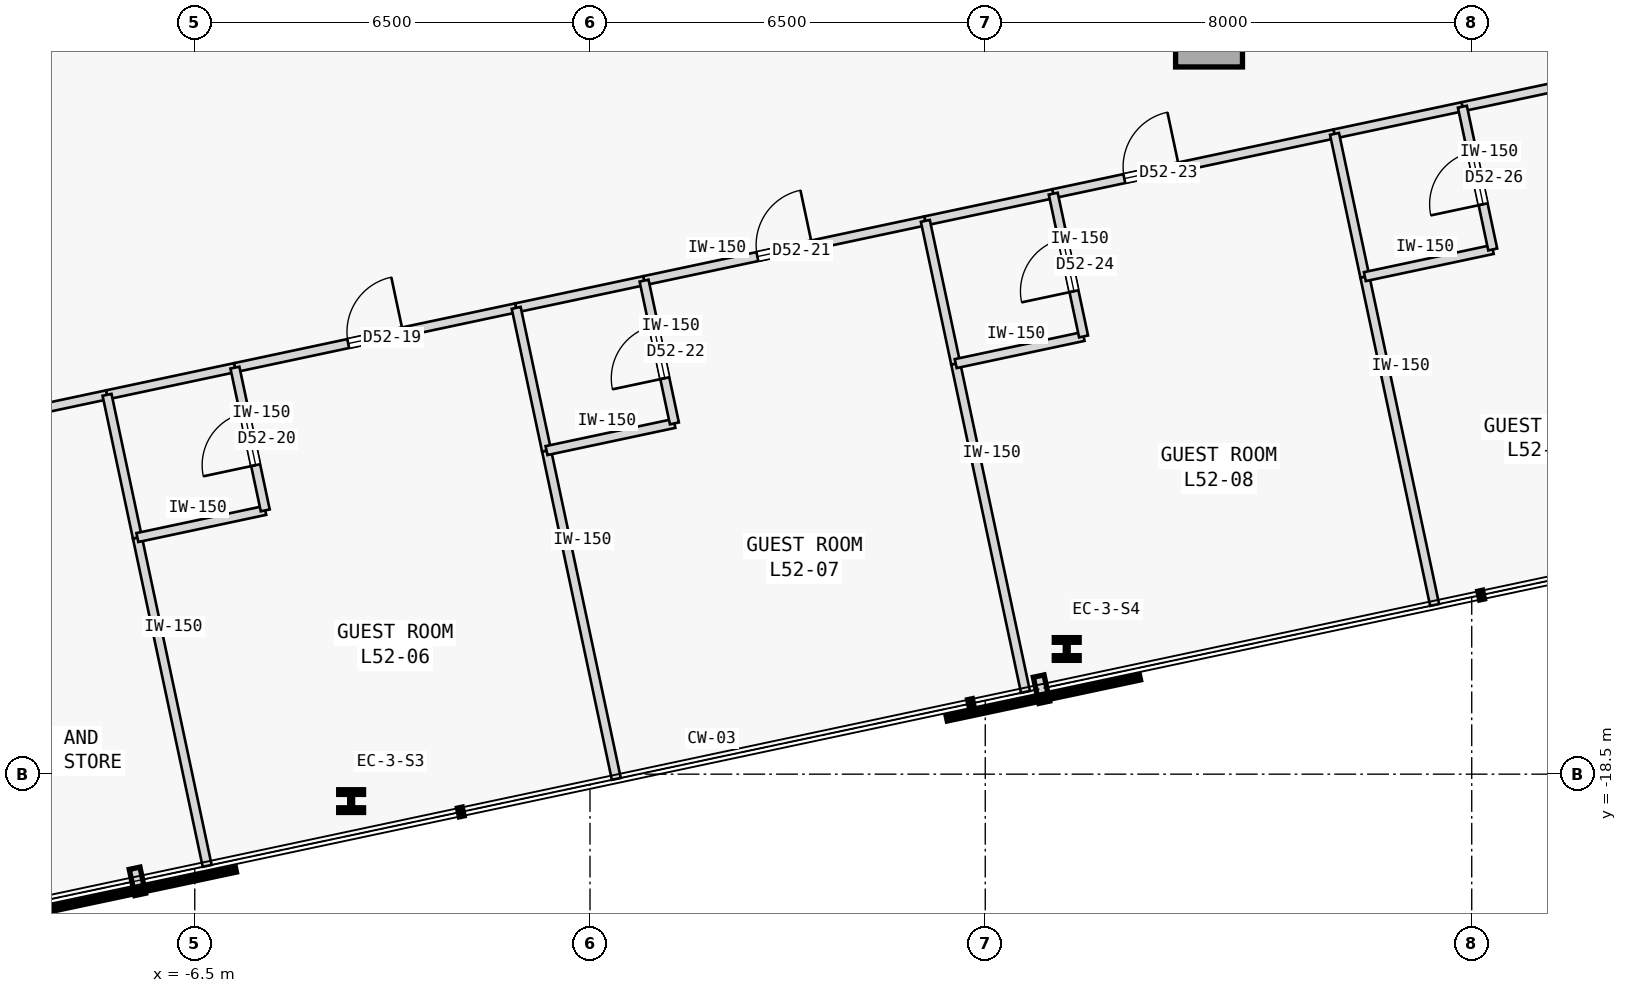
"""IFC4 building model, lengths in metres.
Left out: names, types, materials, properties, quantities, classifications, styles, units other than length and angle.
Written with IfcOpenShell. Run it as: python <this file> out.ifc"""

import sys

from ifc_helpers import new_model, si_unit, direction, frame, frame_2d, origin, origin_2d, place, context, subcontext, project, spatial, rectangle, i_section, extrude, element, fill, save


model = new_model("IFC4")
c1 = context("Model", 3, precision=1e-05, world=origin(), true_north=direction((0.0, 1.0)))
c2 = subcontext(c1, "Body", "Model", "MODEL_VIEW")
j1 = project(units=[si_unit("LENGTHUNIT", "METRE"), si_unit("PLANEANGLEUNIT", "RADIAN")], contexts=[c1])
p1 = place(None, origin())
s1 = spatial("IfcSite", under=j1, at=p1, CompositionType="ELEMENT")
p2 = place(p1, origin())
s2 = spatial("IfcBuilding", under=s1, at=p2, CompositionType="ELEMENT")
p3 = place(p2, frame((0.0, 0.0, 199.0)))
s3 = spatial("IfcBuildingStorey", under=s2, at=p3, CompositionType="ELEMENT", Elevation=199.0)
p4 = place(p3, frame((10.18, -6.32, 0.0), z_axis=(0.0, 0.0, 1.0), x_axis=(1.0, 0.0, 0.0)))
e1 = element("IfcColumn", 1, at=p4, inside=s3, PredefinedType="COLUMN", context=c2, shape_type="SweptSolid", body=[
    extrude(rectangle(XDim=1.1, YDim=1.1, at=origin_2d()), origin(), (0.0, 0.0, 1.0), 3.4),
])
for number, where, z_axis, x_axis in (
    (2, (-3.928, -18.943, 0.0), (0.0, 0.0, 1.0), (1.0, 0.0, 0.0)),
    (3, (7.84, -16.441, 0.0), (0.0, 0.0, 1.0), (1.0, 0.0, 0.0)),
):
    element("IfcColumn", number, at=place(p3, frame(where, z_axis=z_axis, x_axis=x_axis)), inside=s3, PredefinedType="COLUMN", context=c2, shape_type="SweptSolid", body=[
        extrude(i_section(OverallWidth=0.409, OverallDepth=0.374, WebThickness=0.048, FlangeThickness=0.077, FilletRadius=0.015, at=origin_2d()), origin(), (0.0, 0.0, 1.0), 3.4),
    ])
p5 = place(p3, frame((-12.862, -13.307, 0.0), z_axis=(0.0, 0.0, 1.0), x_axis=(0.978145647498, 0.207920879857, 0.0)))
e4 = element("IfcWall", 4, at=p5, inside=s3, PredefinedType="PARTITIONING", context=c2, shape_type="SweptSolid", body=[
    extrude(rectangle(XDim=5.029, YDim=0.15, at=frame_2d((2.515, 0.0))), origin(), (0.0, 0.0, 1.0), 3.0),
])
p6 = place(p3, frame((-5.84, -11.814, 0.0), z_axis=(0.0, 0.0, 1.0), x_axis=(0.978148615161, 0.207906918255, 0.0)))
e5 = element("IfcWall", 5, at=p6, inside=s3, PredefinedType="PARTITIONING", context=c2, shape_type="SweptSolid", body=[
    extrude(rectangle(XDim=4.729, YDim=0.15, at=frame_2d((2.364, 0.0))), origin(), (0.0, 0.0, 1.0), 3.0),
])
p7 = place(p6, frame((1.905, 0.0, 0.0)))
e6 = element("IfcOpeningElement", 6, at=p7, cuts=e5, PredefinedType="OPENING", context=c2, shape_type="SweptSolid", body=[
    extrude(rectangle(XDim=0.92, YDim=2.15, at=frame_2d((0.46, 1.075))), frame((0.0, 0.085, 0.0), z_axis=(0.0, -1.0, 0.0), x_axis=(1.0, 0.0, 0.0)), (0.0, 0.0, 1.0), 0.17),
])
p8 = place(p3, frame((-7.943, -12.261, 0.0), z_axis=(0.0, 0.0, 1.0), x_axis=(0.978146728319, 0.207915795165, 0.0)))
e7 = element("IfcWall", 7, at=p8, inside=s3, PredefinedType="PARTITIONING", context=c2, shape_type="SweptSolid", body=[
    extrude(rectangle(XDim=2.15, YDim=0.15, at=frame_2d((1.075, 0.0))), origin(), (0.0, 0.0, 1.0), 3.0),
])
p9 = place(p3, frame((0.889, -10.384, 0.0), z_axis=(0.0, 0.0, 1.0), x_axis=(0.978150846638, 0.207896419455, 0.0)))
e8 = element("IfcWall", 8, at=p9, inside=s3, PredefinedType="PARTITIONING", context=c2, shape_type="SweptSolid", body=[
    extrude(rectangle(XDim=4.729, YDim=0.15, at=frame_2d((2.365, 0.0))), origin(), (0.0, 0.0, 1.0), 3.0),
])
p10 = place(p9, frame((1.905, 0.0, 0.0)))
e9 = element("IfcOpeningElement", 9, at=p10, cuts=e8, PredefinedType="OPENING", context=c2, shape_type="SweptSolid", body=[
    extrude(rectangle(XDim=0.92, YDim=2.15, at=frame_2d((0.46, 1.075))), frame((0.0, 0.085, 0.0), z_axis=(0.0, -1.0, 0.0), x_axis=(1.0, 0.0, 0.0)), (0.0, 0.0, 1.0), 0.17),
])
p11 = place(p3, frame((-1.214, -10.831, 0.0), z_axis=(0.0, 0.0, 1.0), x_axis=(0.978146728319, 0.207915795165, 0.0)))
e10 = element("IfcWall", 10, at=p11, inside=s3, PredefinedType="PARTITIONING", context=c2, shape_type="SweptSolid", body=[
    extrude(rectangle(XDim=2.15, YDim=0.15, at=frame_2d((1.075, 0.0))), origin(), (0.0, 0.0, 1.0), 3.0),
])
p12 = place(p3, frame((7.618, -8.954, 0.0), z_axis=(0.0, 0.0, 1.0), x_axis=(0.978140347221, 0.207945812984, 0.0)))
e11 = element("IfcWall", 11, at=p12, inside=s3, PredefinedType="PARTITIONING", context=c2, shape_type="SweptSolid", body=[
    extrude(rectangle(XDim=4.729, YDim=0.15, at=frame_2d((2.365, 0.0))), origin(), (0.0, 0.0, 1.0), 3.0),
])
p13 = place(p12, frame((1.195, 0.0, 0.0)))
e12 = element("IfcOpeningElement", 12, at=p13, cuts=e11, PredefinedType="OPENING", context=c2, shape_type="SweptSolid", body=[
    extrude(rectangle(XDim=0.92, YDim=2.15, at=frame_2d((0.46, 1.075))), frame((0.0, 0.085, 0.0), z_axis=(0.0, -1.0, 0.0), x_axis=(1.0, 0.0, 0.0)), (0.0, 0.0, 1.0), 0.17),
])
p14 = place(p3, frame((5.515, -9.401, 0.0), z_axis=(0.0, 0.0, 1.0), x_axis=(0.978146728319, 0.207915795165, 0.0)))
e13 = element("IfcWall", 13, at=p14, inside=s3, PredefinedType="PARTITIONING", context=c2, shape_type="SweptSolid", body=[
    extrude(rectangle(XDim=2.15, YDim=0.15, at=frame_2d((1.075, 0.0))), origin(), (0.0, 0.0, 1.0), 3.0),
])
p15 = place(p3, frame((14.346, -7.524, 0.0), z_axis=(0.0, 0.0, 1.0), x_axis=(0.97816208355, 0.207843542851, 0.0)))
e14 = element("IfcWall", 14, at=p15, inside=s3, PredefinedType="PARTITIONING", context=c2, shape_type="SweptSolid", body=[
    extrude(rectangle(XDim=2.879, YDim=0.15, at=frame_2d((1.439, 0.0))), origin(), (0.0, 0.0, 1.0), 3.0),
])
p16 = place(p3, frame((12.243, -7.971, 0.0), z_axis=(0.0, 0.0, 1.0), x_axis=(0.978146728319, 0.207915795165, 0.0)))
e15 = element("IfcWall", 15, at=p16, inside=s3, PredefinedType="PARTITIONING", context=c2, shape_type="SweptSolid", body=[
    extrude(rectangle(XDim=2.15, YDim=0.15, at=frame_2d((1.075, 0.0))), origin(), (0.0, 0.0, 1.0), 3.0),
])
p17 = place(p3, frame((-6.296, -20.008, 0.0), z_axis=(0.0, 0.0, 1.0), x_axis=(-0.20792487872, 0.978144797466, 0.0)))
e16 = element("IfcWall", 16, at=p17, inside=s3, PredefinedType="PARTITIONING", context=c2, shape_type="SweptSolid", body=[
    extrude(rectangle(XDim=5.52, YDim=0.15, at=frame_2d((2.76, 0.0))), origin(), (0.0, 0.0, 1.0), 3.0),
])
p18 = place(p3, frame((-7.444, -14.609, 0.0), z_axis=(0.0, 0.0, 1.0), x_axis=(-0.207917150959, 0.978146440129, 0.0)))
e17 = element("IfcWall", 17, at=p18, inside=s3, PredefinedType="PARTITIONING", context=c2, shape_type="SweptSolid", body=[
    extrude(rectangle(XDim=2.4, YDim=0.15, at=frame_2d((1.2, 0.0))), origin(), (0.0, 0.0, 1.0), 3.0),
])
p19 = place(p3, frame((-7.444, -14.609, 0.0), z_axis=(0.0, 0.0, 1.0), x_axis=(0.978141818715, 0.207938891219, 0.0)))
e18 = element("IfcWall", 18, at=p19, inside=s3, PredefinedType="PARTITIONING", context=c2, shape_type="SweptSolid", body=[
    extrude(rectangle(XDim=2.15, YDim=0.15, at=frame_2d((1.075, 0.0))), origin(), (0.0, 0.0, 1.0), 3.0),
])
p20 = place(p3, frame((-5.341, -14.162, 0.0), z_axis=(0.0, 0.0, 1.0), x_axis=(-0.207819824493, 0.978167123015, 0.0)))
e19 = element("IfcWall", 19, at=p20, inside=s3, PredefinedType="PARTITIONING", context=c2, shape_type="SweptSolid", body=[
    extrude(rectangle(XDim=2.4, YDim=0.15, at=frame_2d((1.2, 0.0))), origin(), (0.0, 0.0, 1.0), 3.0),
])
p21 = place(p20, frame((0.76, 0.0, 0.0)))
e20 = element("IfcOpeningElement", 20, at=p21, cuts=e19, PredefinedType="OPENING", context=c2, shape_type="SweptSolid", body=[
    extrude(rectangle(XDim=0.88, YDim=2.15, at=frame_2d((0.44, 1.075))), frame((0.0, 0.085, 0.0), z_axis=(0.0, -1.0, 0.0), x_axis=(1.0, 0.0, 0.0)), (0.0, 0.0, 1.0), 0.17),
])
p22 = place(p3, frame((0.433, -18.578, 0.0), z_axis=(0.0, 0.0, 1.0), x_axis=(-0.20791588359, 0.978146709523, 0.0)))
e21 = element("IfcWall", 21, at=p22, inside=s3, PredefinedType="PARTITIONING", context=c2, shape_type="SweptSolid", body=[
    extrude(rectangle(XDim=5.52, YDim=0.15, at=frame_2d((2.76, 0.0))), origin(), (0.0, 0.0, 1.0), 3.0),
])
p23 = place(p3, frame((-0.715, -13.179, 0.0), z_axis=(0.0, 0.0, 1.0), x_axis=(-0.207937840262, 0.978142042133, 0.0)))
e22 = element("IfcWall", 22, at=p23, inside=s3, PredefinedType="PARTITIONING", context=c2, shape_type="SweptSolid", body=[
    extrude(rectangle(XDim=2.4, YDim=0.15, at=frame_2d((1.2, 0.0))), origin(), (0.0, 0.0, 1.0), 3.0),
])
p24 = place(p3, frame((-0.715, -13.179, 0.0), z_axis=(0.0, 0.0, 1.0), x_axis=(0.978146728319, 0.207915795165, 0.0)))
e23 = element("IfcWall", 23, at=p24, inside=s3, PredefinedType="PARTITIONING", context=c2, shape_type="SweptSolid", body=[
    extrude(rectangle(XDim=2.15, YDim=0.15, at=frame_2d((1.075, 0.0))), origin(), (0.0, 0.0, 1.0), 3.0),
])
p25 = place(p3, frame((1.388, -12.732, 0.0), z_axis=(0.0, 0.0, 1.0), x_axis=(-0.207937840262, 0.978142042133, 0.0)))
e24 = element("IfcWall", 24, at=p25, inside=s3, PredefinedType="PARTITIONING", context=c2, shape_type="SweptSolid", body=[
    extrude(rectangle(XDim=2.4, YDim=0.15, at=frame_2d((1.2, 0.0))), origin(), (0.0, 0.0, 1.0), 3.0),
])
p26 = place(p25, frame((0.76, 0.0, 0.0)))
e25 = element("IfcOpeningElement", 25, at=p26, cuts=e24, PredefinedType="OPENING", context=c2, shape_type="SweptSolid", body=[
    extrude(rectangle(XDim=0.88, YDim=2.15, at=frame_2d((0.44, 1.075))), frame((0.0, 0.085, 0.0), z_axis=(0.0, -1.0, 0.0), x_axis=(1.0, 0.0, 0.0)), (0.0, 0.0, 1.0), 0.17),
])
p27 = place(p3, frame((7.161, -17.148, 0.0), z_axis=(0.0, 0.0, 1.0), x_axis=(-0.20791588359, 0.978146709523, 0.0)))
e26 = element("IfcWall", 26, at=p27, inside=s3, PredefinedType="PARTITIONING", context=c2, shape_type="SweptSolid", body=[
    extrude(rectangle(XDim=5.52, YDim=0.15, at=frame_2d((2.76, 0.0))), origin(), (0.0, 0.0, 1.0), 3.0),
])
p28 = place(p3, frame((6.014, -11.749, 0.0), z_axis=(0.0, 0.0, 1.0), x_axis=(-0.207937840262, 0.978142042133, 0.0)))
e27 = element("IfcWall", 27, at=p28, inside=s3, PredefinedType="PARTITIONING", context=c2, shape_type="SweptSolid", body=[
    extrude(rectangle(XDim=2.4, YDim=0.15, at=frame_2d((1.2, 0.0))), origin(), (0.0, 0.0, 1.0), 3.0),
])
p29 = place(p3, frame((6.014, -11.749, 0.0), z_axis=(0.0, 0.0, 1.0), x_axis=(0.978146728319, 0.207915795165, 0.0)))
e28 = element("IfcWall", 28, at=p29, inside=s3, PredefinedType="PARTITIONING", context=c2, shape_type="SweptSolid", body=[
    extrude(rectangle(XDim=2.15, YDim=0.15, at=frame_2d((1.075, 0.0))), origin(), (0.0, 0.0, 1.0), 3.0),
])
p30 = place(p3, frame((8.117, -11.302, 0.0), z_axis=(0.0, 0.0, 1.0), x_axis=(-0.207937840262, 0.978142042133, 0.0)))
e29 = element("IfcWall", 29, at=p30, inside=s3, PredefinedType="PARTITIONING", context=c2, shape_type="SweptSolid", body=[
    extrude(rectangle(XDim=2.4, YDim=0.15, at=frame_2d((1.2, 0.0))), origin(), (0.0, 0.0, 1.0), 3.0),
])
p31 = place(p30, frame((0.76, 0.0, 0.0)))
e30 = element("IfcOpeningElement", 30, at=p31, cuts=e29, PredefinedType="OPENING", context=c2, shape_type="SweptSolid", body=[
    extrude(rectangle(XDim=0.88, YDim=2.15, at=frame_2d((0.44, 1.075))), frame((0.0, 0.085, 0.0), z_axis=(0.0, -1.0, 0.0), x_axis=(1.0, 0.0, 0.0)), (0.0, 0.0, 1.0), 0.17),
])
p32 = place(p3, frame((13.89, -15.718, 0.0), z_axis=(0.0, 0.0, 1.0), x_axis=(-0.207873566928, 0.97815570344, 0.0)))
e31 = element("IfcWall", 31, at=p32, inside=s3, PredefinedType="PARTITIONING", context=c2, shape_type="SweptSolid", body=[
    extrude(rectangle(XDim=5.52, YDim=0.15, at=frame_2d((2.76, 0.0))), origin(), (0.0, 0.0, 1.0), 3.0),
])
p33 = place(p3, frame((12.742, -10.318, 0.0), z_axis=(0.0, 0.0, 1.0), x_axis=(-0.207917150959, 0.978146440129, 0.0)))
e32 = element("IfcWall", 32, at=p33, inside=s3, PredefinedType="PARTITIONING", context=c2, shape_type="SweptSolid", body=[
    extrude(rectangle(XDim=2.4, YDim=0.15, at=frame_2d((1.2, 0.0))), origin(), (0.0, 0.0, 1.0), 3.0),
])
p34 = place(p3, frame((12.742, -10.318, 0.0), z_axis=(0.0, 0.0, 1.0), x_axis=(0.978146728319, 0.207915795165, 0.0)))
e33 = element("IfcWall", 33, at=p34, inside=s3, PredefinedType="PARTITIONING", context=c2, shape_type="SweptSolid", body=[
    extrude(rectangle(XDim=2.15, YDim=0.15, at=frame_2d((1.075, 0.0))), origin(), (0.0, 0.0, 1.0), 3.0),
])
p35 = place(p3, frame((14.845, -9.871, 0.0), z_axis=(0.0, 0.0, 1.0), x_axis=(-0.207917150959, 0.978146440129, 0.0)))
e34 = element("IfcWall", 34, at=p35, inside=s3, PredefinedType="PARTITIONING", context=c2, shape_type="SweptSolid", body=[
    extrude(rectangle(XDim=2.4, YDim=0.15, at=frame_2d((1.2, 0.0))), origin(), (0.0, 0.0, 1.0), 3.0),
])
p36 = place(p35, frame((0.76, 0.0, 0.0)))
e35 = element("IfcOpeningElement", 35, at=p36, cuts=e34, PredefinedType="OPENING", context=c2, shape_type="SweptSolid", body=[
    extrude(rectangle(XDim=0.88, YDim=2.15, at=frame_2d((0.44, 1.075))), frame((0.0, 0.085, 0.0), z_axis=(0.0, -1.0, 0.0), x_axis=(1.0, 0.0, 0.0)), (0.0, 0.0, 1.0), 0.17),
])
p37 = place(p7, origin())
e36 = element("IfcDoor", 36, at=p37, inside=s3, OperationType="SINGLE_SWING_RIGHT", PredefinedType="DOOR", context=c2, shape_type="SweptSolid", body=[
    extrude(rectangle(XDim=0.92, YDim=2.15, at=frame_2d((0.46, 1.075))), frame((0.0, 0.025, 0.0), z_axis=(0.0, -1.0, 0.0), x_axis=(1.0, 0.0, 0.0)), (0.0, 0.0, 1.0), 0.05),
])
fill(e6, e36)
p38 = place(p21, origin())
e37 = element("IfcDoor", 37, at=p38, inside=s3, OperationType="SINGLE_SWING_LEFT", PredefinedType="DOOR", context=c2, shape_type="SweptSolid", body=[
    extrude(rectangle(XDim=0.88, YDim=2.15, at=frame_2d((0.44, 1.075))), frame((0.0, 0.025, 0.0), z_axis=(0.0, -1.0, 0.0), x_axis=(1.0, 0.0, 0.0)), (0.0, 0.0, 1.0), 0.05),
])
fill(e20, e37)
p39 = place(p10, origin())
e38 = element("IfcDoor", 38, at=p39, inside=s3, OperationType="SINGLE_SWING_RIGHT", PredefinedType="DOOR", context=c2, shape_type="SweptSolid", body=[
    extrude(rectangle(XDim=0.92, YDim=2.15, at=frame_2d((0.46, 1.075))), frame((0.0, 0.025, 0.0), z_axis=(0.0, -1.0, 0.0), x_axis=(1.0, 0.0, 0.0)), (0.0, 0.0, 1.0), 0.05),
])
fill(e9, e38)
p40 = place(p26, origin())
e39 = element("IfcDoor", 39, at=p40, inside=s3, OperationType="SINGLE_SWING_LEFT", PredefinedType="DOOR", context=c2, shape_type="SweptSolid", body=[
    extrude(rectangle(XDim=0.88, YDim=2.15, at=frame_2d((0.44, 1.075))), frame((0.0, 0.025, 0.0), z_axis=(0.0, -1.0, 0.0), x_axis=(1.0, 0.0, 0.0)), (0.0, 0.0, 1.0), 0.05),
])
fill(e25, e39)
p41 = place(p13, origin())
e40 = element("IfcDoor", 40, at=p41, inside=s3, OperationType="SINGLE_SWING_RIGHT", PredefinedType="DOOR", context=c2, shape_type="SweptSolid", body=[
    extrude(rectangle(XDim=0.92, YDim=2.15, at=frame_2d((0.46, 1.075))), frame((0.0, 0.025, 0.0), z_axis=(0.0, -1.0, 0.0), x_axis=(1.0, 0.0, 0.0)), (0.0, 0.0, 1.0), 0.05),
])
fill(e12, e40)
p42 = place(p31, origin())
e41 = element("IfcDoor", 41, at=p42, inside=s3, OperationType="SINGLE_SWING_LEFT", PredefinedType="DOOR", context=c2, shape_type="SweptSolid", body=[
    extrude(rectangle(XDim=0.88, YDim=2.15, at=frame_2d((0.44, 1.075))), frame((0.0, 0.025, 0.0), z_axis=(0.0, -1.0, 0.0), x_axis=(1.0, 0.0, 0.0)), (0.0, 0.0, 1.0), 0.05),
])
fill(e30, e41)
p43 = place(p36, origin())
e42 = element("IfcDoor", 42, at=p43, inside=s3, OperationType="SINGLE_SWING_LEFT", PredefinedType="DOOR", context=c2, shape_type="SweptSolid", body=[
    extrude(rectangle(XDim=0.88, YDim=2.15, at=frame_2d((0.44, 1.075))), frame((0.0, 0.025, 0.0), z_axis=(0.0, -1.0, 0.0), x_axis=(1.0, 0.0, 0.0)), (0.0, 0.0, 1.0), 0.05),
])
fill(e35, e42)
save(model, sys.argv[1])
